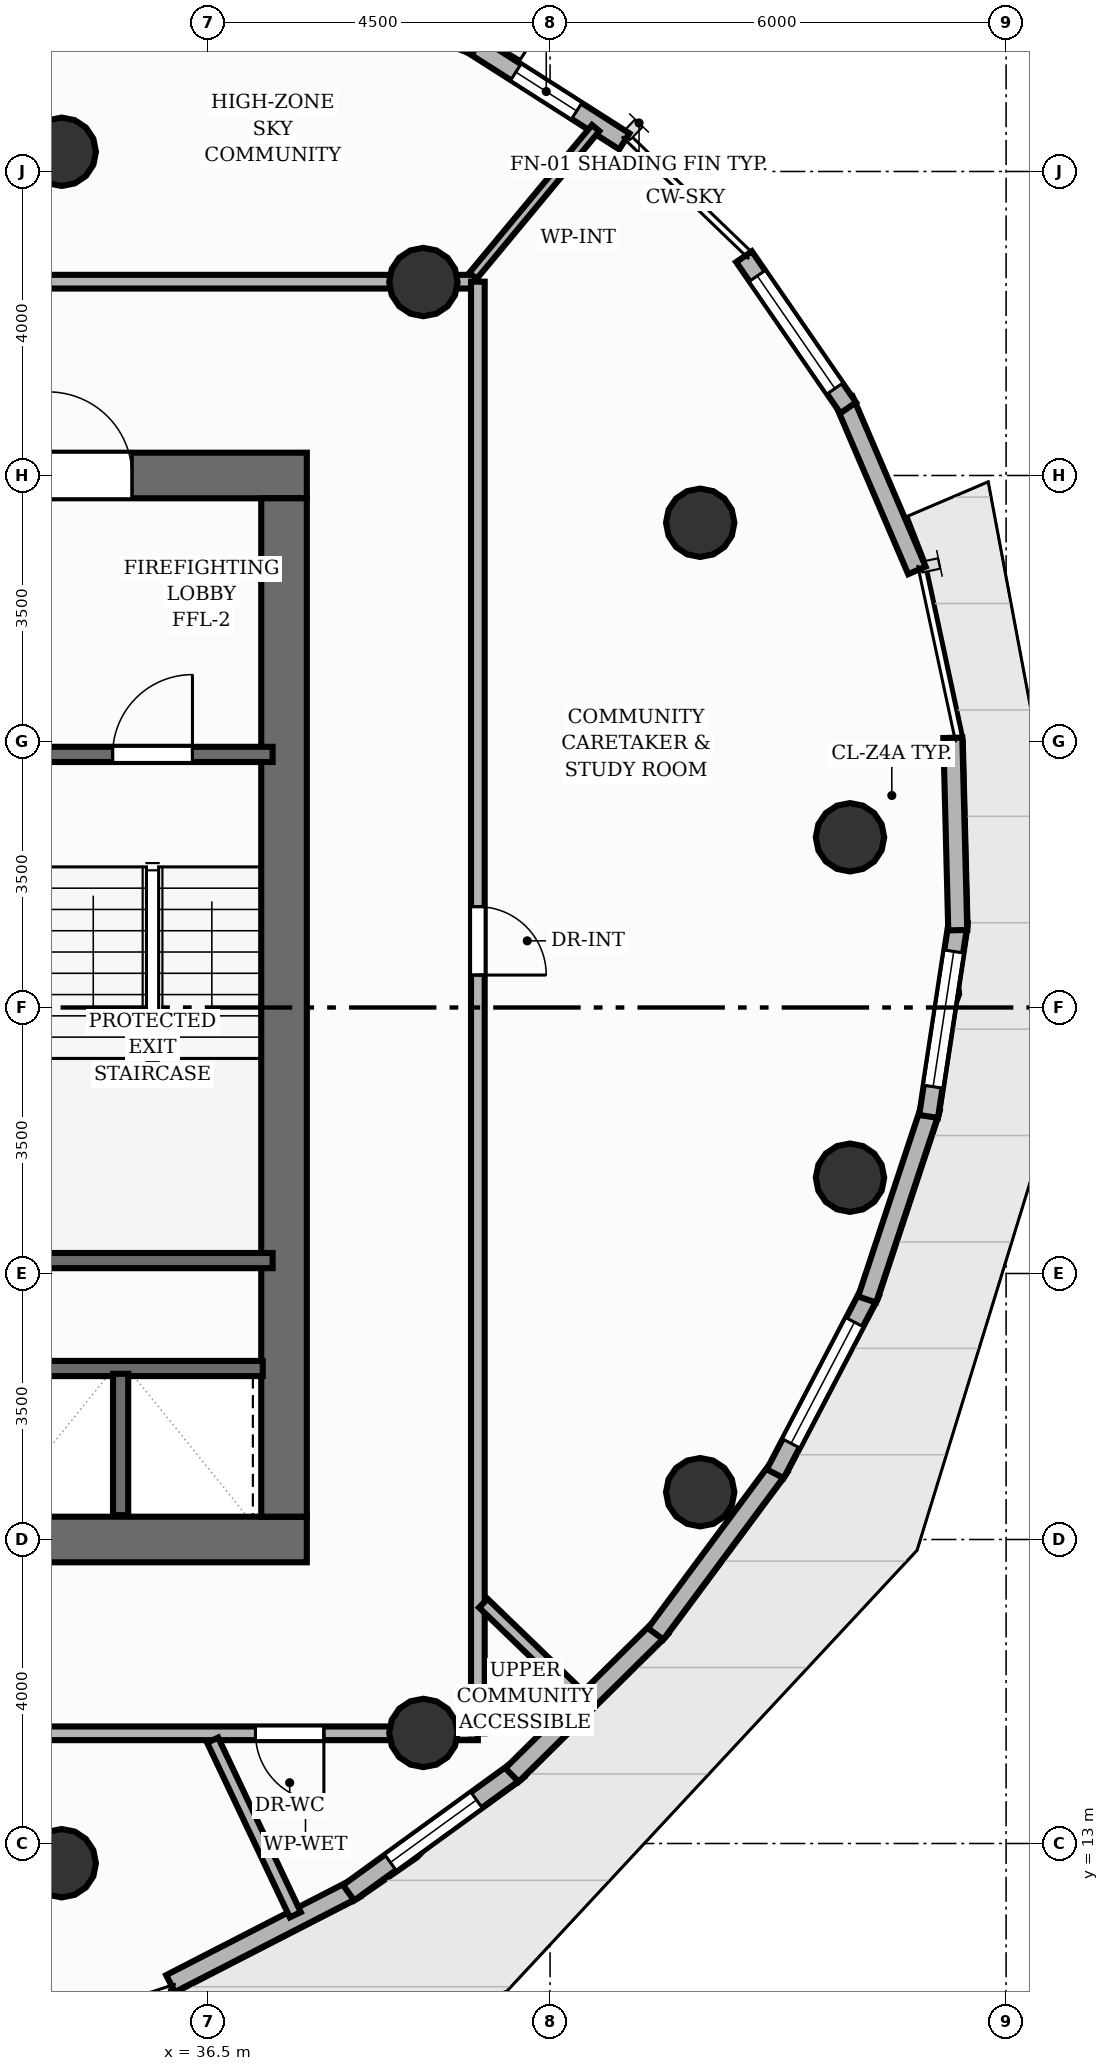
"""IFC4 building model, lengths in metres.
Left out: names, types, materials, properties, quantities, classifications, styles, units other than length and angle.
Written with IfcOpenShell. Run it as: python <this file> out.ifc"""

import sys

from ifc_helpers import new_model, si_unit, direction, frame, frame_2d, origin, origin_2d, place, context, subcontext, project, spatial, rectangle, circle, extrude, element, fill, save


model = new_model("IFC4")
c1 = context("Model", 3, precision=1e-05, world=origin(), true_north=direction((0.0, 1.0)))
c2 = subcontext(c1, "Body", "Model", "MODEL_VIEW")
j1 = project(units=[si_unit("LENGTHUNIT", "METRE"), si_unit("PLANEANGLEUNIT", "RADIAN")], contexts=[c1])
p1 = place(None, origin())
s1 = spatial("IfcSite", under=j1, at=p1, CompositionType="ELEMENT")
p2 = place(p1, origin())
s2 = spatial("IfcBuilding", under=s1, at=p2, CompositionType="ELEMENT")
p3 = place(p2, frame((0.0, 0.0, 163.04)))
s3 = spatial("IfcBuildingStorey", under=s2, at=p3, CompositionType="ELEMENT", Elevation=163.04)
p4 = place(p3, frame((22.7, 17.0, 0.0), z_axis=(0.0, 0.0, 1.0), x_axis=(1.0, 0.0, 0.0)))
e1 = element("IfcWall", 1, at=p4, inside=s3, PredefinedType="SHEAR", context=c2, shape_type="SweptSolid", body=[
    extrude(rectangle(XDim=15.1, YDim=0.6, at=frame_2d((7.55, 0.0))), origin(), (0.0, 0.0, 1.0), 3.2),
])
p5 = place(p4, frame((5.8, 0.0, 0.0)))
e2 = element("IfcOpeningElement", 2, at=p5, cuts=e1, PredefinedType="OPENING", context=c2, shape_type="SweptSolid", body=[
    extrude(rectangle(XDim=1.1, YDim=2.15, at=frame_2d((0.55, 1.075))), frame((0.0, 0.31, 0.0), z_axis=(0.0, -1.0, 0.0), x_axis=(1.0, 0.0, 0.0)), (0.0, 0.0, 1.0), 0.62),
])
p6 = place(p4, frame((9.35, 0.0, 0.0)))
e3 = element("IfcOpeningElement", 3, at=p6, cuts=e1, PredefinedType="OPENING", context=c2, shape_type="SweptSolid", body=[
    extrude(rectangle(XDim=0.9, YDim=2.1, at=frame_2d((0.45, 1.05))), frame((0.0, 0.31, 0.0), z_axis=(0.0, -1.0, 0.0), x_axis=(1.0, 0.0, 0.0)), (0.0, 0.0, 1.0), 0.62),
])
p7 = place(p3, frame((22.7, 31.0, 0.0), z_axis=(0.0, 0.0, 1.0), x_axis=(1.0, 0.0, 0.0)))
e4 = element("IfcWall", 4, at=p7, inside=s3, PredefinedType="SHEAR", context=c2, shape_type="SweptSolid", body=[
    extrude(rectangle(XDim=15.1, YDim=0.6, at=frame_2d((7.55, 0.0))), origin(), (0.0, 0.0, 1.0), 3.2),
])
p8 = place(p7, frame((11.7, 0.0, 0.0)))
e5 = element("IfcOpeningElement", 5, at=p8, cuts=e4, PredefinedType="OPENING", context=c2, shape_type="SweptSolid", body=[
    extrude(rectangle(XDim=1.1, YDim=2.15, at=frame_2d((0.55, 1.075))), frame((0.0, 0.31, 0.0), z_axis=(0.0, -1.0, 0.0), x_axis=(1.0, 0.0, 0.0)), (0.0, 0.0, 1.0), 0.62),
])
p9 = place(p7, frame((4.325, 0.0, 0.0)))
e6 = element("IfcOpeningElement", 6, at=p9, cuts=e4, PredefinedType="OPENING", context=c2, shape_type="SweptSolid", body=[
    extrude(rectangle(XDim=1.05, YDim=2.15, at=frame_2d((0.525, 1.075))), frame((0.0, 0.31, 0.0), z_axis=(0.0, -1.0, 0.0), x_axis=(1.0, 0.0, 0.0)), (0.0, 0.0, 1.0), 0.62),
])
p10 = place(p7, frame((6.075, 0.0, 0.0)))
e7 = element("IfcOpeningElement", 7, at=p10, cuts=e4, PredefinedType="OPENING", context=c2, shape_type="SweptSolid", body=[
    extrude(rectangle(XDim=1.05, YDim=2.15, at=frame_2d((0.525, 1.075))), frame((0.0, 0.31, 0.0), z_axis=(0.0, -1.0, 0.0), x_axis=(1.0, 0.0, 0.0)), (0.0, 0.0, 1.0), 0.62),
])
p11 = place(p7, frame((7.825, 0.0, 0.0)))
e8 = element("IfcOpeningElement", 8, at=p11, cuts=e4, PredefinedType="OPENING", context=c2, shape_type="SweptSolid", body=[
    extrude(rectangle(XDim=1.05, YDim=2.15, at=frame_2d((0.525, 1.075))), frame((0.0, 0.31, 0.0), z_axis=(0.0, -1.0, 0.0), x_axis=(1.0, 0.0, 0.0)), (0.0, 0.0, 1.0), 0.62),
])
p12 = place(p3, frame((37.5, 17.3, 0.0), z_axis=(0.0, 0.0, 1.0), x_axis=(0.0, 1.0, 0.0)))
e9 = element("IfcWall", 9, at=p12, inside=s3, PredefinedType="SHEAR", context=c2, shape_type="SweptSolid", body=[
    extrude(rectangle(XDim=13.4, YDim=0.6, at=frame_2d((6.7, 0.0))), origin(), (0.0, 0.0, 1.0), 3.2),
])
for number, where, z_axis, x_axis in (
    (10, (44.946, 26.24, 0.0), (0.0, 0.0, 1.0), (1.0, 0.0, 0.0)),
    (11, (42.975, 30.378, 0.0), (0.0, 0.0, 1.0), (1.0, 0.0, 0.0)),
    (12, (39.333, 33.545, 0.0), (0.0, 0.0, 1.0), (1.0, 0.0, 0.0)),
    (13, (34.575, 35.26, 0.0), (0.0, 0.0, 1.0), (1.0, 0.0, 0.0)),
    (14, (34.575, 12.74, 0.0), (0.0, 0.0, 1.0), (1.0, 0.0, 0.0)),
    (15, (39.333, 14.455, 0.0), (0.0, 0.0, 1.0), (1.0, 0.0, 0.0)),
    (16, (42.975, 17.622, 0.0), (0.0, 0.0, 1.0), (1.0, 0.0, 0.0)),
    (17, (44.946, 21.76, 0.0), (0.0, 0.0, 1.0), (1.0, 0.0, 0.0)),
):
    element("IfcColumn", number, at=place(p3, frame(where, z_axis=z_axis, x_axis=x_axis)), inside=s3, PredefinedType="COLUMN", context=c2, shape_type="SweptSolid", body=[
        extrude(circle(Radius=0.45, at=origin_2d()), origin(), (0.0, 0.0, 1.0), 3.2),
    ])
p13 = place(p3, frame((39.923, 36.707, 0.0), z_axis=(0.0, 0.0, 1.0), x_axis=(0.842951209937, -0.537990016325, 0.0)))
e18 = element("IfcWall", 18, at=p13, inside=s3, PredefinedType="SOLIDWALL", context=c2, shape_type="SweptSolid", body=[
    extrude(rectangle(XDim=2.437, YDim=0.25, at=frame_2d((1.219, 0.0))), origin(), (0.0, 0.0, 1.0), 2.96),
])
p14 = place(p13, frame((0.743, 0.0, 0.85)))
e19 = element("IfcOpeningElement", 19, at=p14, cuts=e18, PredefinedType="OPENING", context=c2, shape_type="SweptSolid", body=[
    extrude(rectangle(XDim=0.95, YDim=1.45, at=frame_2d((0.475, 0.725))), frame((0.0, 0.135, 0.0), z_axis=(0.0, -1.0, 0.0), x_axis=(1.0, 0.0, 0.0)), (0.0, 0.0, 1.0), 0.27),
])
p15 = place(p3, frame((37.719, 37.563, 0.0), z_axis=(0.0, 0.0, 1.0), x_axis=(0.930554944455, -0.366152284371, 0.0)))
e20 = element("IfcWall", 20, at=p15, inside=s3, PredefinedType="SOLIDWALL", context=c2, shape_type="SweptSolid", body=[
    extrude(rectangle(XDim=2.478, YDim=0.25, at=frame_2d((1.239, 0.0))), origin(), (0.0, 0.0, 1.0), 2.96),
])
p16 = place(p3, frame((38.442, 12.409, 0.0), z_axis=(0.0, 0.0, 1.0), x_axis=(-0.889378950916, -0.457170735796, 0.0)))
e21 = element("IfcWall", 21, at=p16, inside=s3, PredefinedType="SOLIDWALL", context=c2, shape_type="SweptSolid", body=[
    extrude(rectangle(XDim=2.739, YDim=0.25, at=frame_2d((1.369, 0.0))), origin(), (0.0, 0.0, 1.0), 2.96),
])
p17 = place(p3, frame((40.582, 13.972, 0.0), z_axis=(0.0, 0.0, 1.0), x_axis=(-0.809302211878, -0.587392483651, 0.0)))
e22 = element("IfcWall", 22, at=p17, inside=s3, PredefinedType="SOLIDWALL", context=c2, shape_type="SweptSolid", body=[
    extrude(rectangle(XDim=2.758, YDim=0.25, at=frame_2d((1.379, 0.0))), origin(), (0.0, 0.0, 1.0), 2.96),
])
p18 = place(p17, frame((0.679, 0.0, 0.85)))
e23 = element("IfcOpeningElement", 23, at=p18, cuts=e22, PredefinedType="OPENING", context=c2, shape_type="SweptSolid", body=[
    extrude(rectangle(XDim=1.4, YDim=1.52, at=frame_2d((0.7, 0.76))), frame((0.0, 0.135, 0.0), z_axis=(0.0, -1.0, 0.0), x_axis=(1.0, 0.0, 0.0)), (0.0, 0.0, 1.0), 0.27),
])
p19 = place(p3, frame((42.46, 15.84, 0.0), z_axis=(0.0, 0.0, 1.0), x_axis=(-0.711211219647, -0.702978378792, 0.0)))
e24 = element("IfcWall", 24, at=p19, inside=s3, PredefinedType="SOLIDWALL", context=c2, shape_type="SweptSolid", body=[
    extrude(rectangle(XDim=2.758, YDim=0.25, at=frame_2d((1.379, 0.0))), origin(), (0.0, 0.0, 1.0), 2.96),
])
p20 = place(p3, frame((44.021, 17.958, 0.0), z_axis=(0.0, 0.0, 1.0), x_axis=(-0.595783859774, -0.803144814111, 0.0)))
e25 = element("IfcWall", 25, at=p20, inside=s3, PredefinedType="SOLIDWALL", context=c2, shape_type="SweptSolid", body=[
    extrude(rectangle(XDim=2.739, YDim=0.25, at=frame_2d((1.369, 0.0))), origin(), (0.0, 0.0, 1.0), 2.96),
])
p21 = place(p3, frame((45.215, 20.259, 0.0), z_axis=(0.0, 0.0, 1.0), x_axis=(-0.463513901258, -0.886089647463, 0.0)))
e26 = element("IfcWall", 26, at=p21, inside=s3, PredefinedType="SOLIDWALL", context=c2, shape_type="SweptSolid", body=[
    extrude(rectangle(XDim=2.701, YDim=0.25, at=frame_2d((1.351, 0.0))), origin(), (0.0, 0.0, 1.0), 2.96),
])
p22 = place(p21, frame((0.451, 0.0, 0.85)))
e27 = element("IfcOpeningElement", 27, at=p22, cuts=e26, PredefinedType="OPENING", context=c2, shape_type="SweptSolid", body=[
    extrude(rectangle(XDim=1.8, YDim=2.0, at=frame_2d((0.9, 1.0))), frame((0.0, 0.135, 0.0), z_axis=(0.0, -1.0, 0.0), x_axis=(1.0, 0.0, 0.0)), (0.0, 0.0, 1.0), 0.27),
])
p23 = place(p3, frame((46.006, 22.674, 0.0), z_axis=(0.0, 0.0, 1.0), x_axis=(-0.314763160498, -0.949170244368, 0.0)))
e28 = element("IfcWall", 28, at=p23, inside=s3, PredefinedType="SOLIDWALL", context=c2, shape_type="SweptSolid", body=[
    extrude(rectangle(XDim=2.651, YDim=0.25, at=frame_2d((1.326, 0.0))), origin(), (0.0, 0.0, 1.0), 2.96),
])
p24 = place(p3, frame((46.371, 25.129, 0.0), z_axis=(0.0, 0.0, 1.0), x_axis=(-0.150882230886, -0.988551744929, 0.0)))
e29 = element("IfcWall", 29, at=p24, inside=s3, PredefinedType="SOLIDWALL", context=c2, shape_type="SweptSolid", body=[
    extrude(rectangle(XDim=2.592, YDim=0.25, at=frame_2d((1.296, 0.0))), origin(), (0.0, 0.0, 1.0), 2.96),
])
p25 = place(p24, frame((0.396, 0.0, 0.85)))
e30 = element("IfcOpeningElement", 30, at=p25, cuts=e29, PredefinedType="OPENING", context=c2, shape_type="SweptSolid", body=[
    extrude(rectangle(XDim=1.8, YDim=2.0, at=frame_2d((0.9, 1.0))), frame((0.0, 0.135, 0.0), z_axis=(0.0, -1.0, 0.0), x_axis=(1.0, 0.0, 0.0)), (0.0, 0.0, 1.0), 0.27),
])
p26 = place(p3, frame((46.299, 27.549, 0.0), z_axis=(0.0, 0.0, 1.0), x_axis=(0.025647424719, -0.999671050699, 0.0)))
e31 = element("IfcWall", 31, at=p26, inside=s3, PredefinedType="SOLIDWALL", context=c2, shape_type="SweptSolid", body=[
    extrude(rectangle(XDim=2.532, YDim=0.25, at=frame_2d((1.266, 0.0))), origin(), (0.0, 0.0, 1.0), 2.96),
])
p27 = place(p3, frame((44.867, 31.991, 0.0), z_axis=(0.0, 0.0, 1.0), x_axis=(0.393822567199, -0.919186480299, 0.0)))
e32 = element("IfcWall", 32, at=p27, inside=s3, PredefinedType="SOLIDWALL", context=c2, shape_type="SweptSolid", body=[
    extrude(rectangle(XDim=2.437, YDim=0.25, at=frame_2d((1.219, 0.0))), origin(), (0.0, 0.0, 1.0), 2.96),
])
p28 = place(p3, frame((43.552, 33.879, 0.0), z_axis=(0.0, 0.0, 1.0), x_axis=(0.567536828079, -0.823348011945, 0.0)))
e33 = element("IfcWall", 33, at=p28, inside=s3, PredefinedType="SOLIDWALL", context=c2, shape_type="SweptSolid", body=[
    extrude(rectangle(XDim=2.415, YDim=0.25, at=frame_2d((1.207, 0.0))), origin(), (0.0, 0.0, 1.0), 2.96),
])
p29 = place(p28, frame((0.307, 0.0, 0.85)))
e34 = element("IfcOpeningElement", 34, at=p29, cuts=e33, PredefinedType="OPENING", context=c2, shape_type="SweptSolid", body=[
    extrude(rectangle(XDim=1.8, YDim=2.0, at=frame_2d((0.9, 1.0))), frame((0.0, 0.135, 0.0), z_axis=(0.0, -1.0, 0.0), x_axis=(1.0, 0.0, 0.0)), (0.0, 0.0, 1.0), 0.27),
])
p30 = place(p3, frame((34.11, 20.67, 0.0), z_axis=(0.0, 0.0, 1.0), x_axis=(1.0, 0.0, 0.0)))
e35 = element("IfcWall", 35, at=p30, inside=s3, PredefinedType="SHEAR", context=c2, shape_type="SweptSolid", body=[
    extrude(rectangle(XDim=3.24, YDim=0.2, at=frame_2d((1.62, 0.0))), origin(), (0.0, 0.0, 1.0), 3.2),
])
p31 = place(p3, frame((34.11, 27.33, 0.0), z_axis=(0.0, 0.0, 1.0), x_axis=(1.0, 0.0, 0.0)))
e36 = element("IfcWall", 36, at=p31, inside=s3, PredefinedType="SHEAR", context=c2, shape_type="SweptSolid", body=[
    extrude(rectangle(XDim=3.24, YDim=0.2, at=frame_2d((1.62, 0.0))), origin(), (0.0, 0.0, 1.0), 3.2),
])
p32 = place(p31, frame((1.135, 0.0, 0.0)))
e37 = element("IfcOpeningElement", 37, at=p32, cuts=e36, PredefinedType="OPENING", context=c2, shape_type="SweptSolid", body=[
    extrude(rectangle(XDim=1.05, YDim=2.15, at=frame_2d((0.525, 1.075))), frame((0.0, 0.11, 0.0), z_axis=(0.0, -1.0, 0.0), x_axis=(1.0, 0.0, 0.0)), (0.0, 0.0, 1.0), 0.22),
])
p33 = place(p3, frame((33.5, 19.25, 0.0), z_axis=(0.0, 0.0, 1.0), x_axis=(1.0, 0.0, 0.0)))
e38 = element("IfcWall", 38, at=p33, inside=s3, PredefinedType="SHEAR", context=c2, shape_type="SweptSolid", body=[
    extrude(rectangle(XDim=3.72, YDim=0.2, at=frame_2d((1.86, 0.0))), origin(), (0.0, 0.0, 1.0), 3.2),
])
p34 = place(p3, frame((35.35, 17.32, 0.0), z_axis=(0.0, 0.0, 1.0), x_axis=(0.0, 1.0, 0.0)))
e39 = element("IfcWall", 39, at=p34, inside=s3, PredefinedType="SHEAR", context=c2, shape_type="SweptSolid", body=[
    extrude(rectangle(XDim=1.86, YDim=0.2, at=frame_2d((0.93, 0.0))), origin(), (0.0, 0.0, 1.0), 3.2),
])
p35 = place(p3, frame((23.024, 33.55, 0.0), z_axis=(0.0, 0.0, 1.0), x_axis=(1.0, 0.0, 0.0)))
e40 = element("IfcWall", 40, at=p35, inside=s3, PredefinedType="PARTITIONING", context=c2, shape_type="SweptSolid", body=[
    extrude(rectangle(XDim=17.026, YDim=0.18, at=frame_2d((8.513, 0.0))), origin(), (0.0, 0.0, 1.0), 2.488),
])
p36 = place(p35, frame((8.012, 0.0, 0.0)))
e41 = element("IfcOpeningElement", 41, at=p36, cuts=e40, PredefinedType="OPENING", context=c2, shape_type="SweptSolid", body=[
    extrude(rectangle(XDim=0.9, YDim=2.1, at=frame_2d((0.45, 1.05))), frame((0.0, 0.1, 0.0), z_axis=(0.0, -1.0, 0.0), x_axis=(1.0, 0.0, 0.0)), (0.0, 0.0, 1.0), 0.2),
])
p37 = place(p3, frame((40.05, 14.45, 0.0), z_axis=(0.0, 0.0, 1.0), x_axis=(-1.0, 0.0, 0.0)))
e42 = element("IfcWall", 42, at=p37, inside=s3, PredefinedType="PARTITIONING", context=c2, shape_type="SweptSolid", body=[
    extrude(rectangle(XDim=19.6, YDim=0.18, at=frame_2d((9.8, 0.0))), origin(), (0.0, 0.0, 1.0), 2.488),
])
p38 = place(p37, frame((11.105, 0.0, 0.0)))
e43 = element("IfcOpeningElement", 43, at=p38, cuts=e42, PredefinedType="OPENING", context=c2, shape_type="SweptSolid", body=[
    extrude(rectangle(XDim=0.9, YDim=2.1, at=frame_2d((0.45, 1.05))), frame((0.0, 0.1, 0.0), z_axis=(0.0, -1.0, 0.0), x_axis=(1.0, 0.0, 0.0)), (0.0, 0.0, 1.0), 0.2),
])
p39 = place(p37, frame((2.026, 0.0, 0.0)))
e44 = element("IfcOpeningElement", 44, at=p39, cuts=e42, PredefinedType="OPENING", context=c2, shape_type="SweptSolid", body=[
    extrude(rectangle(XDim=0.9, YDim=2.1, at=frame_2d((0.45, 1.05))), frame((0.0, 0.1, 0.0), z_axis=(0.0, -1.0, 0.0), x_axis=(1.0, 0.0, 0.0)), (0.0, 0.0, 1.0), 0.2),
])
p40 = place(p3, frame((40.05, 33.55, 0.0), z_axis=(0.0, 0.0, 1.0), x_axis=(0.0, -1.0, 0.0)))
e45 = element("IfcWall", 45, at=p40, inside=s3, PredefinedType="PARTITIONING", context=c2, shape_type="SweptSolid", body=[
    extrude(rectangle(XDim=19.1, YDim=0.18, at=frame_2d((9.55, 0.0))), origin(), (0.0, 0.0, 1.0), 2.955),
])
p41 = place(p40, frame((8.223, 0.0, 0.0)))
e46 = element("IfcOpeningElement", 46, at=p41, cuts=e45, PredefinedType="OPENING", context=c2, shape_type="SweptSolid", body=[
    extrude(rectangle(XDim=0.9, YDim=2.1, at=frame_2d((0.45, 1.05))), frame((0.0, 0.1, 0.0), z_axis=(0.0, -1.0, 0.0), x_axis=(1.0, 0.0, 0.0)), (0.0, 0.0, 1.0), 0.2),
])
p42 = place(p3, frame((41.6, 35.572, 0.0), z_axis=(0.0, 0.0, 1.0), x_axis=(-0.638500632437, -0.769621298027, 0.0)))
e47 = element("IfcWall", 47, at=p42, inside=s3, PredefinedType="PARTITIONING", context=c2, shape_type="SweptSolid", body=[
    extrude(rectangle(XDim=2.527, YDim=0.125, at=frame_2d((1.263, 0.0))), origin(), (0.0, 0.0, 1.0), 2.955),
])
p43 = place(p3, frame((36.561, 14.36, 0.0), z_axis=(0.0, 0.0, 1.0), x_axis=(0.427702244689, -0.903919681105, 0.0)))
e48 = element("IfcWall", 48, at=p43, inside=s3, PredefinedType="PLUMBINGWALL", context=c2, shape_type="SweptSolid", body=[
    extrude(rectangle(XDim=2.541, YDim=0.16, at=frame_2d((1.271, 0.0))), origin(), (0.0, 0.0, 1.0), 2.955),
])
p44 = place(p3, frame((41.43, 14.9, 0.0), z_axis=(0.0, 0.0, 1.0), x_axis=(-0.719616607648, 0.694371613761, 0.0)))
e49 = element("IfcWall", 49, at=p44, inside=s3, PredefinedType="PLUMBINGWALL", context=c2, shape_type="SweptSolid", body=[
    extrude(rectangle(XDim=1.818, YDim=0.16, at=frame_2d((0.909, 0.0))), origin(), (0.0, 0.0, 1.0), 2.692),
])
p45 = place(p14, origin())
e50 = element("IfcWindow", 50, at=p45, inside=s3, PartitioningType="SINGLE_PANEL", PredefinedType="WINDOW", context=c2, shape_type="SweptSolid", body=[
    extrude(rectangle(XDim=0.95, YDim=1.45, at=frame_2d((0.475, 0.725))), frame((0.0, 0.03, 0.0), z_axis=(0.0, -1.0, 0.0), x_axis=(1.0, 0.0, 0.0)), (0.0, 0.0, 1.0), 0.06),
])
fill(e19, e50)
p46 = place(p18, origin())
e51 = element("IfcWindow", 51, at=p46, inside=s3, PartitioningType="SINGLE_PANEL", PredefinedType="WINDOW", context=c2, shape_type="SweptSolid", body=[
    extrude(rectangle(XDim=1.4, YDim=1.52, at=frame_2d((0.7, 0.76))), frame((0.0, 0.03, 0.0), z_axis=(0.0, -1.0, 0.0), x_axis=(1.0, 0.0, 0.0)), (0.0, 0.0, 1.0), 0.06),
])
fill(e23, e51)
p47 = place(p22, origin())
e52 = element("IfcWindow", 52, at=p47, inside=s3, PartitioningType="SINGLE_PANEL", PredefinedType="WINDOW", context=c2, shape_type="SweptSolid", body=[
    extrude(rectangle(XDim=1.8, YDim=2.0, at=frame_2d((0.9, 1.0))), frame((0.0, 0.03, 0.0), z_axis=(0.0, -1.0, 0.0), x_axis=(1.0, 0.0, 0.0)), (0.0, 0.0, 1.0), 0.06),
])
fill(e27, e52)
p48 = place(p25, origin())
e53 = element("IfcWindow", 53, at=p48, inside=s3, PartitioningType="SINGLE_PANEL", PredefinedType="WINDOW", context=c2, shape_type="SweptSolid", body=[
    extrude(rectangle(XDim=1.8, YDim=2.0, at=frame_2d((0.9, 1.0))), frame((0.0, 0.03, 0.0), z_axis=(0.0, -1.0, 0.0), x_axis=(1.0, 0.0, 0.0)), (0.0, 0.0, 1.0), 0.06),
])
fill(e30, e53)
p49 = place(p29, origin())
e54 = element("IfcWindow", 54, at=p49, inside=s3, PartitioningType="SINGLE_PANEL", PredefinedType="WINDOW", context=c2, shape_type="SweptSolid", body=[
    extrude(rectangle(XDim=1.8, YDim=2.0, at=frame_2d((0.9, 1.0))), frame((0.0, 0.03, 0.0), z_axis=(0.0, -1.0, 0.0), x_axis=(1.0, 0.0, 0.0)), (0.0, 0.0, 1.0), 0.06),
])
fill(e34, e54)
p50 = place(p32, origin())
e55 = element("IfcDoor", 55, at=p50, inside=s3, OperationType="SINGLE_SWING_RIGHT", PredefinedType="DOOR", context=c2, shape_type="SweptSolid", body=[
    extrude(rectangle(XDim=1.05, YDim=2.15, at=frame_2d((0.525, 1.075))), frame((0.0, 0.025, 0.0), z_axis=(0.0, -1.0, 0.0), x_axis=(1.0, 0.0, 0.0)), (0.0, 0.0, 1.0), 0.05),
])
fill(e37, e55)
p51 = place(p8, origin())
e56 = element("IfcDoor", 56, at=p51, inside=s3, OperationType="SINGLE_SWING_LEFT", PredefinedType="DOOR", context=c2, shape_type="SweptSolid", body=[
    extrude(rectangle(XDim=1.1, YDim=2.15, at=frame_2d((0.55, 1.075))), frame((0.0, 0.025, 0.0), z_axis=(0.0, -1.0, 0.0), x_axis=(1.0, 0.0, 0.0)), (0.0, 0.0, 1.0), 0.05),
])
fill(e5, e56)
p52 = place(p41, origin())
e57 = element("IfcDoor", 57, at=p52, inside=s3, OperationType="SINGLE_SWING_RIGHT", PredefinedType="DOOR", context=c2, shape_type="SweptSolid", body=[
    extrude(rectangle(XDim=0.9, YDim=2.1, at=frame_2d((0.45, 1.05))), frame((0.0, 0.025, 0.0), z_axis=(0.0, -1.0, 0.0), x_axis=(1.0, 0.0, 0.0)), (0.0, 0.0, 1.0), 0.05),
])
fill(e46, e57)
p53 = place(p39, origin())
e58 = element("IfcDoor", 58, at=p53, inside=s3, OperationType="SINGLE_SWING_LEFT", PredefinedType="DOOR", context=c2, shape_type="SweptSolid", body=[
    extrude(rectangle(XDim=0.9, YDim=2.1, at=frame_2d((0.45, 1.05))), frame((0.0, 0.025, 0.0), z_axis=(0.0, -1.0, 0.0), x_axis=(1.0, 0.0, 0.0)), (0.0, 0.0, 1.0), 0.05),
])
fill(e44, e58)
save(model, sys.argv[1])
